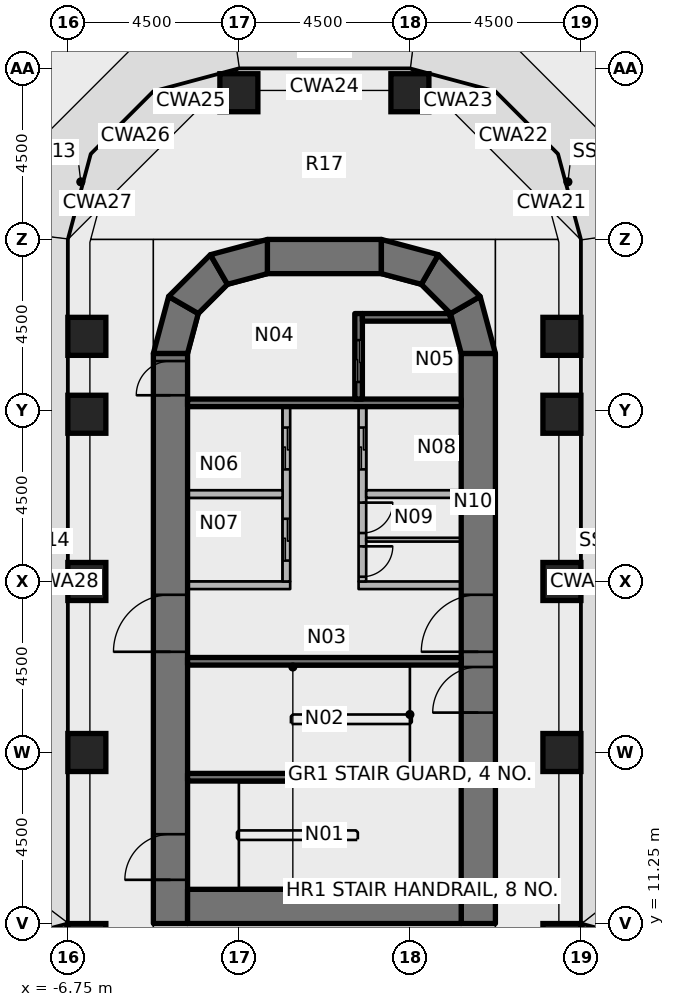
"""IFC4 building model, lengths in metres.
Left out: names, types, materials, properties, quantities, classifications, styles, units other than length and angle.
Written with IfcOpenShell. Run it as: python <this file> out.ifc"""

import sys

from ifc_helpers import new_model, si_unit, direction, frame, frame_2d, origin, origin_2d, place, context, subcontext, project, spatial, polyline, rectangle, outline, extrude, element, fill, save


model = new_model("IFC4")
c1 = context("Model", 3, precision=1e-05, world=origin(), true_north=direction((0.0, 1.0)))
c2 = subcontext(c1, "Body", "Model", "MODEL_VIEW")
j1 = project(units=[si_unit("LENGTHUNIT", "METRE"), si_unit("PLANEANGLEUNIT", "RADIAN")], contexts=[c1])
p1 = place(None, origin())
s1 = spatial("IfcSite", under=j1, at=p1, CompositionType="ELEMENT")
p2 = place(p1, origin())
s2 = spatial("IfcBuilding", under=s1, at=p2, CompositionType="ELEMENT")
p3 = place(p2, frame((0.0, 0.0, 27.0)))
s3 = spatial("IfcBuildingStorey", under=s2, at=p3, CompositionType="ELEMENT", Elevation=27.0)
for number, where, z_axis, x_axis in (
    (1, (-6.25, 10.75, 0.0), (0.0, 0.0, 1.0), (1.0, 0.0, 0.0)),
    (2, (-6.25, 15.75, 0.0), (0.0, 0.0, 1.0), (1.0, 0.0, 0.0)),
    (3, (-6.25, 20.25, 0.0), (0.0, 0.0, 1.0), (1.0, 0.0, 0.0)),
    (4, (-6.25, 24.65, 0.0), (0.0, 0.0, 1.0), (1.0, 0.0, 0.0)),
    (5, (-6.25, 26.7, 0.0), (0.0, 0.0, 1.0), (1.0, 0.0, 0.0)),
    (6, (-2.25, 33.11, 0.0), (0.0, 0.0, 1.0), (1.0, 0.0, 0.0)),
    (7, (2.25, 33.11, 0.0), (0.0, 0.0, 1.0), (1.0, 0.0, 0.0)),
    (8, (6.25, 10.75, 0.0), (0.0, 0.0, 1.0), (1.0, 0.0, 0.0)),
    (9, (6.25, 15.75, 0.0), (0.0, 0.0, 1.0), (1.0, 0.0, 0.0)),
    (10, (6.25, 20.25, 0.0), (0.0, 0.0, 1.0), (1.0, 0.0, 0.0)),
    (11, (6.25, 24.65, 0.0), (0.0, 0.0, 1.0), (1.0, 0.0, 0.0)),
    (12, (6.25, 26.7, 0.0), (0.0, 0.0, 1.0), (1.0, 0.0, 0.0)),
):
    element("IfcColumn", number, at=place(p3, frame(where, z_axis=z_axis, x_axis=x_axis)), inside=s3, PredefinedType="COLUMN", context=c2, shape_type="SweptSolid", body=[
        extrude(rectangle(XDim=1.0, YDim=1.0, at=origin_2d()), origin(), (0.0, 0.0, 1.0), 4.05),
    ])
p4 = place(p3, frame((-4.05, 11.25, 0.0), z_axis=(0.0, 0.0, 1.0), x_axis=(0.0, 1.0, 0.0)))
e13 = element("IfcWall", 13, at=p4, inside=s3, PredefinedType="SHEAR", context=c2, shape_type="SweptSolid", body=[
    extrude(rectangle(XDim=15.0, YDim=0.9, at=frame_2d((7.5, 0.0))), origin(), (0.0, 0.0, 1.0), 4.2),
])
p5 = place(p4, frame((7.15, 0.0, 0.0)))
e14 = element("IfcOpeningElement", 14, at=p5, cuts=e13, PredefinedType="OPENING", context=c2, shape_type="SweptSolid", body=[
    extrude(rectangle(XDim=1.5, YDim=2.3, at=frame_2d((0.75, 1.15))), frame((0.0, 0.46, 0.0), z_axis=(0.0, -1.0, 0.0), x_axis=(1.0, 0.0, 0.0)), (0.0, 0.0, 1.0), 0.92),
])
p6 = place(p4, frame((13.9, 0.0, 0.0)))
e15 = element("IfcOpeningElement", 15, at=p6, cuts=e13, PredefinedType="OPENING", context=c2, shape_type="SweptSolid", body=[
    extrude(rectangle(XDim=0.9, YDim=2.1, at=frame_2d((0.45, 1.05))), frame((0.0, 0.46, 0.0), z_axis=(0.0, -1.0, 0.0), x_axis=(1.0, 0.0, 0.0)), (0.0, 0.0, 1.0), 0.92),
])
p7 = place(p4, frame((1.15, 0.0, 0.0)))
e16 = element("IfcOpeningElement", 16, at=p7, cuts=e13, PredefinedType="OPENING", context=c2, shape_type="SweptSolid", body=[
    extrude(rectangle(XDim=1.2, YDim=2.1, at=frame_2d((0.6, 1.05))), frame((0.0, 0.46, 0.0), z_axis=(0.0, -1.0, 0.0), x_axis=(1.0, 0.0, 0.0)), (0.0, 0.0, 1.0), 0.92),
])
p8 = place(p3, frame((4.05, 11.25, 0.0), z_axis=(0.0, 0.0, 1.0), x_axis=(0.0, 1.0, 0.0)))
e17 = element("IfcWall", 17, at=p8, inside=s3, PredefinedType="SHEAR", context=c2, shape_type="SweptSolid", body=[
    extrude(rectangle(XDim=15.0, YDim=0.9, at=frame_2d((7.5, 0.0))), origin(), (0.0, 0.0, 1.0), 4.2),
])
p9 = place(p8, frame((7.15, 0.0, 0.0)))
e18 = element("IfcOpeningElement", 18, at=p9, cuts=e17, PredefinedType="OPENING", context=c2, shape_type="SweptSolid", body=[
    extrude(rectangle(XDim=1.5, YDim=2.3, at=frame_2d((0.75, 1.15))), frame((0.0, 0.46, 0.0), z_axis=(0.0, -1.0, 0.0), x_axis=(1.0, 0.0, 0.0)), (0.0, 0.0, 1.0), 0.92),
])
p10 = place(p8, frame((5.55, 0.0, 0.0)))
e19 = element("IfcOpeningElement", 19, at=p10, cuts=e17, PredefinedType="OPENING", context=c2, shape_type="SweptSolid", body=[
    extrude(rectangle(XDim=1.2, YDim=2.1, at=frame_2d((0.6, 1.05))), frame((0.0, 0.46, 0.0), z_axis=(0.0, -1.0, 0.0), x_axis=(1.0, 0.0, 0.0)), (0.0, 0.0, 1.0), 0.92),
])
p11 = place(p3, frame((-3.6, 11.7, 0.0), z_axis=(0.0, 0.0, 1.0), x_axis=(1.0, 0.0, 0.0)))
e20 = element("IfcWall", 20, at=p11, inside=s3, PredefinedType="SHEAR", context=c2, shape_type="SweptSolid", body=[
    extrude(rectangle(XDim=7.2, YDim=0.9, at=frame_2d((3.6, 0.0))), origin(), (0.0, 0.0, 1.0), 4.2),
])
p12 = place(p3, frame((-1.5, 28.8, 0.0), z_axis=(0.0, 0.0, 1.0), x_axis=(1.0, 0.0, 0.0)))
e21 = element("IfcWall", 21, at=p12, inside=s3, PredefinedType="SHEAR", context=c2, shape_type="SweptSolid", body=[
    extrude(rectangle(XDim=3.0, YDim=0.9, at=frame_2d((1.5, 0.0))), origin(), (0.0, 0.0, 1.0), 4.2),
])
p13 = place(p3, origin())
e22 = element("IfcWall", 22, at=p13, inside=s3, PredefinedType="SHEAR", context=c2, shape_type="SweptSolid", body=[
    extrude(outline(polyline([(-4.5, 26.25), (-4.098, 27.75), (-3.319, 27.3), (-3.6, 26.25), (-4.5, 26.25)])), origin(), (0.0, 0.0, 1.0), 4.2),
])
p14 = place(p3, origin())
e23 = element("IfcWall", 23, at=p14, inside=s3, PredefinedType="SHEAR", context=c2, shape_type="SweptSolid", body=[
    extrude(outline(polyline([(-4.098, 27.75), (-3.0, 28.848), (-2.55, 28.069), (-3.319, 27.3), (-4.098, 27.75)])), origin(), (0.0, 0.0, 1.0), 4.2),
])
p15 = place(p3, origin())
e24 = element("IfcWall", 24, at=p15, inside=s3, PredefinedType="SHEAR", context=c2, shape_type="SweptSolid", body=[
    extrude(outline(polyline([(-3.0, 28.848), (-1.5, 29.25), (-1.5, 28.35), (-2.55, 28.069), (-3.0, 28.848)])), origin(), (0.0, 0.0, 1.0), 4.2),
])
p16 = place(p3, origin())
e25 = element("IfcWall", 25, at=p16, inside=s3, PredefinedType="SHEAR", context=c2, shape_type="SweptSolid", body=[
    extrude(outline(polyline([(4.5, 26.25), (4.098, 27.75), (3.319, 27.3), (3.6, 26.25), (4.5, 26.25)])), origin(), (0.0, 0.0, 1.0), 4.2),
])
p17 = place(p3, origin())
e26 = element("IfcWall", 26, at=p17, inside=s3, PredefinedType="SHEAR", context=c2, shape_type="SweptSolid", body=[
    extrude(outline(polyline([(4.098, 27.75), (3.0, 28.848), (2.55, 28.069), (3.319, 27.3), (4.098, 27.75)])), origin(), (0.0, 0.0, 1.0), 4.2),
])
p18 = place(p3, origin())
e27 = element("IfcWall", 27, at=p18, inside=s3, PredefinedType="SHEAR", context=c2, shape_type="SweptSolid", body=[
    extrude(outline(polyline([(3.0, 28.848), (1.5, 29.25), (1.5, 28.35), (2.55, 28.069), (3.0, 28.848)])), origin(), (0.0, 0.0, 1.0), 4.2),
])
p19 = place(p3, frame((-3.6, 24.95, 0.0), z_axis=(0.0, 0.0, 1.0), x_axis=(1.0, 0.0, 0.0)))
e28 = element("IfcWall", 28, at=p19, inside=s3, PredefinedType="SHEAR", context=c2, shape_type="SweptSolid", body=[
    extrude(rectangle(XDim=7.2, YDim=0.2, at=frame_2d((3.6, 0.0))), origin(), (0.0, 0.0, 1.0), 4.05),
])
p20 = place(p3, frame((0.9, 27.3, 0.0), z_axis=(0.0, 0.0, 1.0), x_axis=(0.0, -1.0, 0.0)))
e29 = element("IfcWall", 29, at=p20, inside=s3, PredefinedType="SHEAR", context=c2, shape_type="SweptSolid", body=[
    extrude(rectangle(XDim=2.25, YDim=0.2, at=frame_2d((1.125, 0.0))), origin(), (0.0, 0.0, 1.0), 4.05),
])
p21 = place(p20, frame((0.7, 0.0, 0.0)))
e30 = element("IfcOpeningElement", 30, at=p21, cuts=e29, PredefinedType="OPENING", context=c2, shape_type="SweptSolid", body=[
    extrude(rectangle(XDim=1.1, YDim=2.3, at=frame_2d((0.55, 1.15))), frame((0.0, 0.11, 0.0), z_axis=(0.0, -1.0, 0.0), x_axis=(1.0, 0.0, 0.0)), (0.0, 0.0, 1.0), 0.22),
])
p22 = place(p3, origin())
e31 = element("IfcWall", 31, at=p22, inside=s3, PredefinedType="SHEAR", context=c2, shape_type="SweptSolid", body=[
    extrude(outline(polyline([(1.0, 27.1), (3.341, 27.1), (3.291, 27.284), (3.275, 27.3), (1.0, 27.3), (1.0, 27.1)])), origin(), (0.0, 0.0, 1.0), 4.05),
])
for number, where, z_axis, x_axis in (
    (32, (-3.6, 18.15, 0.0), (0.0, 0.0, 1.0), (1.0, 0.0, 0.0)),
    (33, (-3.6, 15.1, 0.0), (0.0, 0.0, 1.0), (1.0, 0.0, 0.0)),
):
    element("IfcWall", number, at=place(p3, frame(where, z_axis=z_axis, x_axis=x_axis)), inside=s3, PredefinedType="SHEAR", context=c2, shape_type="SweptSolid", body=[
        extrude(rectangle(XDim=7.2, YDim=0.2, at=frame_2d((3.6, 0.0))), origin(), (0.0, 0.0, 1.0), 4.05),
    ])
p23 = place(p3, frame((-3.6, 20.15, 0.0), z_axis=(0.0, 0.0, 1.0), x_axis=(1.0, 0.0, 0.0)))
e34 = element("IfcWall", 34, at=p23, inside=s3, PredefinedType="PARTITIONING", context=c2, shape_type="SweptSolid", body=[
    extrude(rectangle(XDim=2.7, YDim=0.2, at=frame_2d((1.35, 0.0))), origin(), (0.0, 0.0, 1.0), 4.05),
])
p24 = place(p3, frame((-1.0, 24.85, 0.0), z_axis=(0.0, 0.0, 1.0), x_axis=(0.0, -1.0, 0.0)))
e35 = element("IfcWall", 35, at=p24, inside=s3, PredefinedType="PARTITIONING", context=c2, shape_type="SweptSolid", body=[
    extrude(rectangle(XDim=4.6, YDim=0.2, at=frame_2d((2.3, 0.0))), origin(), (0.0, 0.0, 1.0), 4.05),
])
p25 = place(p24, frame((0.55, 0.0, 0.0)))
e36 = element("IfcOpeningElement", 36, at=p25, cuts=e35, PredefinedType="OPENING", context=c2, shape_type="SweptSolid", body=[
    extrude(rectangle(XDim=1.1, YDim=2.3, at=frame_2d((0.55, 1.15))), frame((0.0, 0.11, 0.0), z_axis=(0.0, -1.0, 0.0), x_axis=(1.0, 0.0, 0.0)), (0.0, 0.0, 1.0), 0.22),
])
p26 = place(p24, frame((2.95, 0.0, 0.0)))
e37 = element("IfcOpeningElement", 37, at=p26, cuts=e35, PredefinedType="OPENING", context=c2, shape_type="SweptSolid", body=[
    extrude(rectangle(XDim=1.1, YDim=2.3, at=frame_2d((0.55, 1.15))), frame((0.0, 0.11, 0.0), z_axis=(0.0, -1.0, 0.0), x_axis=(1.0, 0.0, 0.0)), (0.0, 0.0, 1.0), 0.22),
])
p27 = place(p3, frame((0.9, 20.15, 0.0), z_axis=(0.0, 0.0, 1.0), x_axis=(1.0, 0.0, 0.0)))
e38 = element("IfcWall", 38, at=p27, inside=s3, PredefinedType="PARTITIONING", context=c2, shape_type="SweptSolid", body=[
    extrude(rectangle(XDim=2.7, YDim=0.2, at=frame_2d((1.35, 0.0))), origin(), (0.0, 0.0, 1.0), 4.05),
])
p28 = place(p3, frame((1.0, 24.85, 0.0), z_axis=(0.0, 0.0, 1.0), x_axis=(0.0, -1.0, 0.0)))
e39 = element("IfcWall", 39, at=p28, inside=s3, PredefinedType="PARTITIONING", context=c2, shape_type="SweptSolid", body=[
    extrude(rectangle(XDim=4.6, YDim=0.2, at=frame_2d((2.3, 0.0))), origin(), (0.0, 0.0, 1.0), 4.05),
])
p29 = place(p28, frame((0.55, 0.0, 0.0)))
e40 = element("IfcOpeningElement", 40, at=p29, cuts=e39, PredefinedType="OPENING", context=c2, shape_type="SweptSolid", body=[
    extrude(rectangle(XDim=1.1, YDim=2.3, at=frame_2d((0.55, 1.15))), frame((0.0, 0.11, 0.0), z_axis=(0.0, -1.0, 0.0), x_axis=(1.0, 0.0, 0.0)), (0.0, 0.0, 1.0), 0.22),
])
p30 = place(p28, frame((2.525, 0.0, 0.0)))
e41 = element("IfcOpeningElement", 41, at=p30, cuts=e39, PredefinedType="OPENING", context=c2, shape_type="SweptSolid", body=[
    extrude(rectangle(XDim=0.8, YDim=2.1, at=frame_2d((0.4, 1.05))), frame((0.0, 0.11, 0.0), z_axis=(0.0, -1.0, 0.0), x_axis=(1.0, 0.0, 0.0)), (0.0, 0.0, 1.0), 0.22),
])
p31 = place(p28, frame((3.675, 0.0, 0.0)))
e42 = element("IfcOpeningElement", 42, at=p31, cuts=e39, PredefinedType="OPENING", context=c2, shape_type="SweptSolid", body=[
    extrude(rectangle(XDim=0.8, YDim=2.1, at=frame_2d((0.4, 1.05))), frame((0.0, 0.11, 0.0), z_axis=(0.0, -1.0, 0.0), x_axis=(1.0, 0.0, 0.0)), (0.0, 0.0, 1.0), 0.22),
])
for number, where, z_axis, x_axis in (
    (43, (-3.6, 22.55, 0.0), (0.0, 0.0, 1.0), (1.0, 0.0, 0.0)),
    (44, (1.1, 22.55, 0.0), (0.0, 0.0, 1.0), (1.0, 0.0, 0.0)),
):
    element("IfcWall", number, at=place(p3, frame(where, z_axis=z_axis, x_axis=x_axis)), inside=s3, PredefinedType="PARTITIONING", context=c2, shape_type="SweptSolid", body=[
        extrude(rectangle(XDim=2.5, YDim=0.2, at=frame_2d((1.25, 0.0))), origin(), (0.0, 0.0, 1.0), 4.05),
    ])
p32 = place(p3, frame((1.1, 21.35, 0.0), z_axis=(0.0, 0.0, 1.0), x_axis=(1.0, 0.0, 0.0)))
e45 = element("IfcWall", 45, at=p32, inside=s3, PredefinedType="PARTITIONING", context=c2, shape_type="SweptSolid", body=[
    extrude(rectangle(XDim=2.5, YDim=0.1, at=frame_2d((1.25, 0.0))), origin(), (0.0, 0.0, 1.0), 4.05),
])
p33 = place(p5, origin())
e46 = element("IfcDoor", 46, at=p33, inside=s3, OperationType="DOUBLE_DOOR_SINGLE_SWING", PredefinedType="DOOR", context=c2, shape_type="SweptSolid", body=[
    extrude(rectangle(XDim=1.5, YDim=2.3, at=frame_2d((0.75, 1.15))), frame((0.0, 0.025, 0.0), z_axis=(0.0, -1.0, 0.0), x_axis=(1.0, 0.0, 0.0)), (0.0, 0.0, 1.0), 0.05),
])
fill(e14, e46)
p34 = place(p9, origin())
e47 = element("IfcDoor", 47, at=p34, inside=s3, OperationType="DOUBLE_DOOR_SINGLE_SWING", PredefinedType="DOOR", context=c2, shape_type="SweptSolid", body=[
    extrude(rectangle(XDim=1.5, YDim=2.3, at=frame_2d((0.75, 1.15))), frame((0.0, 0.025, 0.0), z_axis=(0.0, -1.0, 0.0), x_axis=(1.0, 0.0, 0.0)), (0.0, 0.0, 1.0), 0.05),
])
fill(e18, e47)
p35 = place(p6, origin())
e48 = element("IfcDoor", 48, at=p35, inside=s3, OperationType="SINGLE_SWING_LEFT", PredefinedType="DOOR", context=c2, shape_type="SweptSolid", body=[
    extrude(rectangle(XDim=0.9, YDim=2.1, at=frame_2d((0.45, 1.05))), frame((0.0, 0.025, 0.0), z_axis=(0.0, -1.0, 0.0), x_axis=(1.0, 0.0, 0.0)), (0.0, 0.0, 1.0), 0.05),
])
fill(e15, e48)
p36 = place(p10, origin())
e49 = element("IfcDoor", 49, at=p36, inside=s3, OperationType="SINGLE_SWING_LEFT", PredefinedType="DOOR", context=c2, shape_type="SweptSolid", body=[
    extrude(rectangle(XDim=1.2, YDim=2.1, at=frame_2d((0.6, 1.05))), frame((0.0, 0.025, 0.0), z_axis=(0.0, -1.0, 0.0), x_axis=(1.0, 0.0, 0.0)), (0.0, 0.0, 1.0), 0.05),
])
fill(e19, e49)
p37 = place(p7, origin())
e50 = element("IfcDoor", 50, at=p37, inside=s3, OperationType="SINGLE_SWING_LEFT", PredefinedType="DOOR", context=c2, shape_type="SweptSolid", body=[
    extrude(rectangle(XDim=1.2, YDim=2.1, at=frame_2d((0.6, 1.05))), frame((0.0, 0.025, 0.0), z_axis=(0.0, -1.0, 0.0), x_axis=(1.0, 0.0, 0.0)), (0.0, 0.0, 1.0), 0.05),
])
fill(e16, e50)
p38 = place(p21, origin())
e51 = element("IfcDoor", 51, at=p38, inside=s3, OperationType="DOUBLE_DOOR_SLIDING", PredefinedType="DOOR", context=c2, shape_type="SweptSolid", body=[
    extrude(rectangle(XDim=1.1, YDim=2.3, at=frame_2d((0.55, 1.15))), frame((0.0, 0.025, 0.0), z_axis=(0.0, -1.0, 0.0), x_axis=(1.0, 0.0, 0.0)), (0.0, 0.0, 1.0), 0.05),
])
fill(e30, e51)
p39 = place(p25, origin())
e52 = element("IfcDoor", 52, at=p39, inside=s3, OperationType="DOUBLE_DOOR_SLIDING", PredefinedType="DOOR", context=c2, shape_type="SweptSolid", body=[
    extrude(rectangle(XDim=1.1, YDim=2.3, at=frame_2d((0.55, 1.15))), frame((0.0, 0.025, 0.0), z_axis=(0.0, -1.0, 0.0), x_axis=(1.0, 0.0, 0.0)), (0.0, 0.0, 1.0), 0.05),
])
fill(e36, e52)
p40 = place(p26, origin())
e53 = element("IfcDoor", 53, at=p40, inside=s3, OperationType="DOUBLE_DOOR_SLIDING", PredefinedType="DOOR", context=c2, shape_type="SweptSolid", body=[
    extrude(rectangle(XDim=1.1, YDim=2.3, at=frame_2d((0.55, 1.15))), frame((0.0, 0.025, 0.0), z_axis=(0.0, -1.0, 0.0), x_axis=(1.0, 0.0, 0.0)), (0.0, 0.0, 1.0), 0.05),
])
fill(e37, e53)
p41 = place(p29, origin())
e54 = element("IfcDoor", 54, at=p41, inside=s3, OperationType="DOUBLE_DOOR_SLIDING", PredefinedType="DOOR", context=c2, shape_type="SweptSolid", body=[
    extrude(rectangle(XDim=1.1, YDim=2.3, at=frame_2d((0.55, 1.15))), frame((0.0, 0.025, 0.0), z_axis=(0.0, -1.0, 0.0), x_axis=(1.0, 0.0, 0.0)), (0.0, 0.0, 1.0), 0.05),
])
fill(e40, e54)
p42 = place(p30, origin())
e55 = element("IfcDoor", 55, at=p42, inside=s3, OperationType="SINGLE_SWING_LEFT", PredefinedType="DOOR", context=c2, shape_type="SweptSolid", body=[
    extrude(rectangle(XDim=0.8, YDim=2.1, at=frame_2d((0.4, 1.05))), frame((0.0, 0.025, 0.0), z_axis=(0.0, -1.0, 0.0), x_axis=(1.0, 0.0, 0.0)), (0.0, 0.0, 1.0), 0.05),
])
fill(e41, e55)
p43 = place(p31, origin())
e56 = element("IfcDoor", 56, at=p43, inside=s3, OperationType="SINGLE_SWING_RIGHT", PredefinedType="DOOR", context=c2, shape_type="SweptSolid", body=[
    extrude(rectangle(XDim=0.8, YDim=2.1, at=frame_2d((0.4, 1.05))), frame((0.0, 0.025, 0.0), z_axis=(0.0, -1.0, 0.0), x_axis=(1.0, 0.0, 0.0)), (0.0, 0.0, 1.0), 0.05),
])
fill(e42, e56)
save(model, sys.argv[1])
